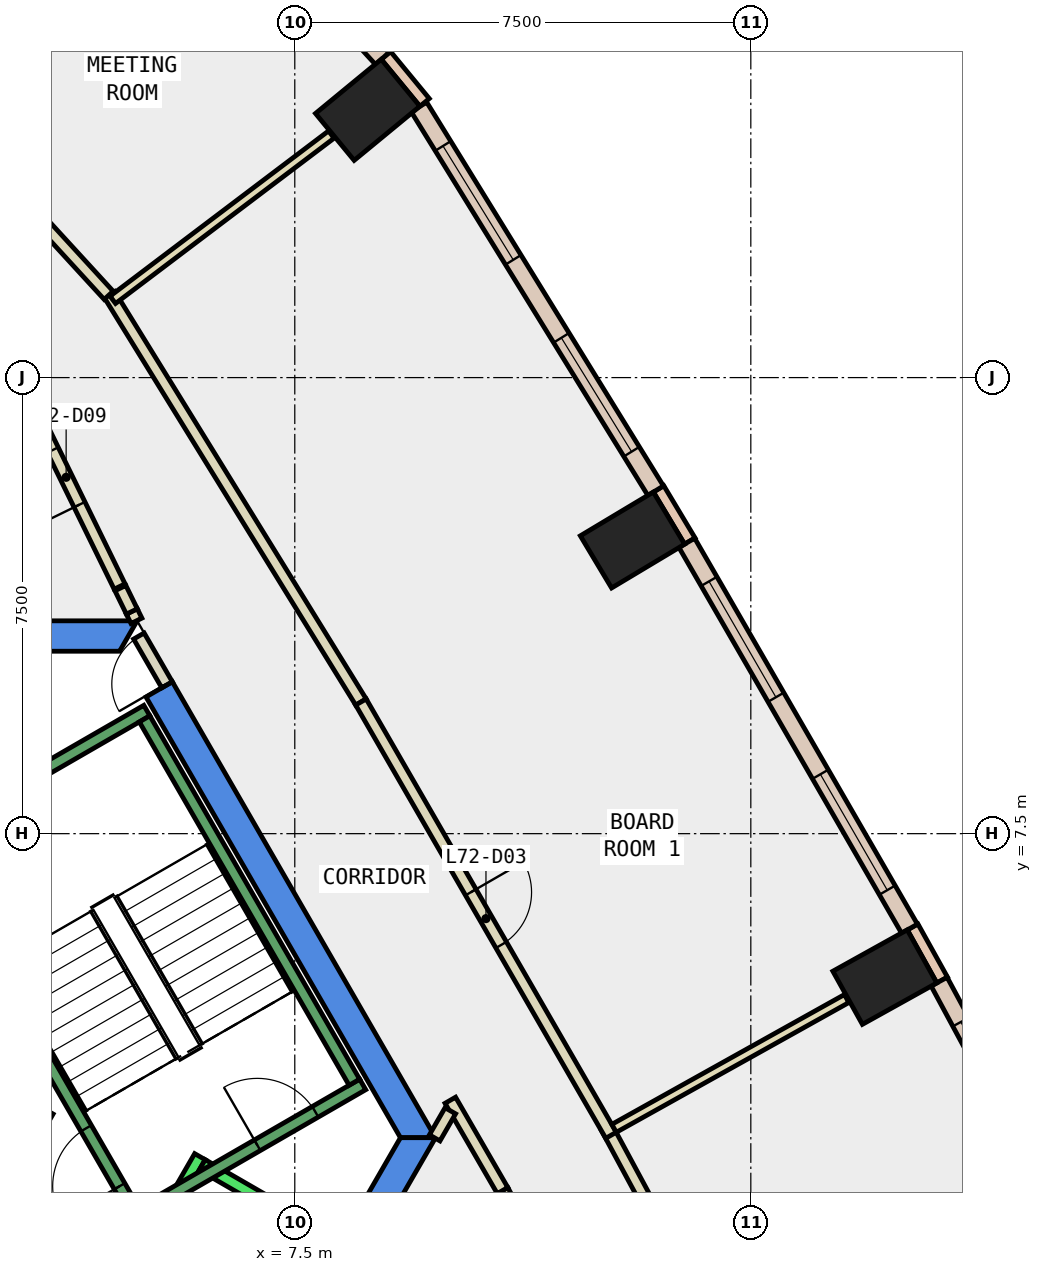
"""IFC4 building model, lengths in metres.
Left out: names, types, materials, properties, quantities, classifications, styles, units other than length and angle.
Written with IfcOpenShell. Run it as: python <this file> out.ifc"""

import sys

from ifc_helpers import new_model, si_unit, direction, frame, frame_2d, origin, origin_2d, place, context, subcontext, project, spatial, polyline, rectangle, outline, extrude, element, fill, save


model = new_model("IFC4")
c1 = context("Model", 3, precision=1e-05, world=origin(), true_north=direction((0.0, 1.0)))
c2 = subcontext(c1, "Body", "Model", "MODEL_VIEW")
j1 = project(units=[si_unit("LENGTHUNIT", "METRE"), si_unit("PLANEANGLEUNIT", "RADIAN")], contexts=[c1])
p1 = place(None, origin())
s1 = spatial("IfcSite", under=j1, at=p1, CompositionType="ELEMENT")
p2 = place(p1, origin())
s2 = spatial("IfcBuilding", under=s1, at=p2, CompositionType="ELEMENT")
p3 = place(p2, frame((0.0, 0.0, 308.0)))
s3 = spatial("IfcBuildingStorey", under=s2, at=p3, CompositionType="ELEMENT", Elevation=308.0)
for number, where, z_axis, x_axis in (
    (1, (17.204, 5.141, -0.34), (0.0, 0.0, 1.0), (-0.486, 0.874, 0.0)),
    (2, (13.054, 12.329, -0.34), (0.0, 0.0, 1.0), (-0.514, 0.858, 0.0)),
    (3, (8.699, 19.403, -0.34), (0.0, 0.0, 1.0), (-0.636, 0.772, 0.0)),
):
    element("IfcColumn", number, at=place(p3, frame(where, z_axis=z_axis, x_axis=x_axis)), inside=s3, PredefinedType="COLUMN", context=c2, shape_type="SweptSolid", body=[
        extrude(rectangle(XDim=1.0, YDim=1.4, at=origin_2d()), origin(), (0.0, 0.0, 1.0), 3.6),
    ])
p4 = place(p3, frame((0.0, 0.0, -0.34)))
e4 = element("IfcWall", 4, at=p4, inside=s3, PredefinedType="SHEAR", context=c2, shape_type="SweptSolid", body=[
    extrude(outline(polyline([(5.486, 9.998), (5.053, 9.748), (9.238, 2.5), (9.815, 2.5), (5.486, 9.998)])), origin(), (0.0, 0.0, 1.0), 3.6),
])
p5 = place(p3, frame((0.0, 0.0, -0.34)))
e5 = element("IfcWall", 5, at=p5, inside=s3, PredefinedType="SHEAR", context=c2, shape_type="SweptSolid", body=[
    extrude(outline(polyline([(4.907, 11.0), (-4.907, 11.0), (-4.619, 10.5), (4.619, 10.5), (4.907, 11.0)])), origin(), (0.0, 0.0, 1.0), 3.6),
])
p6 = place(p3, frame((0.0, 0.0, -0.34)))
e6 = element("IfcWall", 6, at=p6, inside=s3, PredefinedType="SHEAR", context=c2, shape_type="SweptSolid", body=[
    extrude(outline(polyline([(4.907, -6.0), (9.815, 2.5), (9.238, 2.5), (4.619, -5.5), (4.907, -6.0)])), origin(), (0.0, 0.0, 1.0), 3.6),
])
p7 = place(p3, frame((18.147, 5.092, 0.0), z_axis=(0.0, 0.0, 1.0), x_axis=(-0.486036693078, 0.873938403425, 0.0)))
e7 = element("IfcWall", 7, at=p7, inside=s3, PredefinedType="STANDARD", context=c2, shape_type="SweptSolid", body=[
    extrude(rectangle(XDim=1.0, YDim=0.2, at=frame_2d((0.5, 0.0))), origin(), (0.0, 0.0, 1.0), 3.26),
])
p8 = place(p3, frame((13.997, 12.312, 0.0), z_axis=(0.0, 0.0, 1.0), x_axis=(-0.514064933905, 0.857751271482, 0.0)))
e8 = element("IfcWall", 8, at=p8, inside=s3, PredefinedType="STANDARD", context=c2, shape_type="SweptSolid", body=[
    extrude(rectangle(XDim=1.0, YDim=0.2, at=frame_2d((0.5, 0.0))), origin(), (0.0, 0.0, 1.0), 3.26),
])
p9 = place(p3, frame((9.635, 19.525, 0.0), z_axis=(0.0, 0.0, 1.0), x_axis=(-0.6357329148, 0.77190910154, 0.0)))
e9 = element("IfcWall", 9, at=p9, inside=s3, PredefinedType="STANDARD", context=c2, shape_type="SweptSolid", body=[
    extrude(rectangle(XDim=1.0, YDim=0.2, at=frame_2d((0.5, 0.0))), origin(), (0.0, 0.0, 1.0), 3.26),
])
p10 = place(p3, frame((21.615, -1.462, 0.0), z_axis=(0.0, 0.0, 1.0), x_axis=(-0.474421773145, 0.880297666228, 0.0)))
e10 = element("IfcWall", 10, at=p10, inside=s3, PredefinedType="STANDARD", context=c2, shape_type="SweptSolid", body=[
    extrude(rectangle(XDim=7.416, YDim=0.3, at=frame_2d((3.708, 0.0))), origin(), (0.0, 0.0, 1.0), 3.26),
])
p11 = place(p10, frame((0.754, 0.0, 0.9)))
e11 = element("IfcOpeningElement", 11, at=p11, cuts=e10, PredefinedType="OPENING", context=c2, shape_type="SweptSolid", body=[
    extrude(rectangle(XDim=2.2, YDim=2.0, at=frame_2d((1.1, 1.0))), frame((0.0, 0.16, 0.0), z_axis=(0.0, -1.0, 0.0), x_axis=(1.0, 0.0, 0.0)), (0.0, 0.0, 1.0), 0.32),
])
p12 = place(p10, frame((4.462, 0.0, 0.9)))
e12 = element("IfcOpeningElement", 12, at=p12, cuts=e10, PredefinedType="OPENING", context=c2, shape_type="SweptSolid", body=[
    extrude(rectangle(XDim=2.2, YDim=2.0, at=frame_2d((1.1, 1.0))), frame((0.0, 0.16, 0.0), z_axis=(0.0, -1.0, 0.0), x_axis=(1.0, 0.0, 0.0)), (0.0, 0.0, 1.0), 0.32),
])
p13 = place(p3, frame((17.61, 5.937, 0.0), z_axis=(0.0, 0.0, 1.0), x_axis=(-0.499923391538, 0.866069629183, 0.0)))
e13 = element("IfcWall", 13, at=p13, inside=s3, PredefinedType="STANDARD", context=c2, shape_type="SweptSolid", body=[
    extrude(rectangle(XDim=7.327, YDim=0.3, at=frame_2d((3.664, 0.0))), origin(), (0.0, 0.0, 1.0), 3.26),
])
p14 = place(p13, frame((0.732, 0.0, 0.9)))
e14 = element("IfcOpeningElement", 14, at=p14, cuts=e13, PredefinedType="OPENING", context=c2, shape_type="SweptSolid", body=[
    extrude(rectangle(XDim=2.2, YDim=2.0, at=frame_2d((1.1, 1.0))), frame((0.0, 0.16, 0.0), z_axis=(0.0, -1.0, 0.0), x_axis=(1.0, 0.0, 0.0)), (0.0, 0.0, 1.0), 0.32),
])
p15 = place(p13, frame((4.395, 0.0, 0.9)))
e15 = element("IfcOpeningElement", 15, at=p15, cuts=e13, PredefinedType="OPENING", context=c2, shape_type="SweptSolid", body=[
    extrude(rectangle(XDim=2.2, YDim=2.0, at=frame_2d((1.1, 1.0))), frame((0.0, 0.16, 0.0), z_axis=(0.0, -1.0, 0.0), x_axis=(1.0, 0.0, 0.0)), (0.0, 0.0, 1.0), 0.32),
])
p16 = place(p3, frame((13.435, 13.14, 0.0), z_axis=(0.0, 0.0, 1.0), x_axis=(-0.525070792614, 0.851058554239, 0.0)))
e16 = element("IfcWall", 16, at=p16, inside=s3, PredefinedType="STANDARD", context=c2, shape_type="SweptSolid", body=[
    extrude(rectangle(XDim=7.414, YDim=0.3, at=frame_2d((3.707, 0.0))), origin(), (0.0, 0.0, 1.0), 3.26),
])
p17 = place(p16, frame((0.754, 0.0, 0.9)))
e17 = element("IfcOpeningElement", 17, at=p17, cuts=e16, PredefinedType="OPENING", context=c2, shape_type="SweptSolid", body=[
    extrude(rectangle(XDim=2.2, YDim=2.0, at=frame_2d((1.1, 1.0))), frame((0.0, 0.16, 0.0), z_axis=(0.0, -1.0, 0.0), x_axis=(1.0, 0.0, 0.0)), (0.0, 0.0, 1.0), 0.32),
])
p18 = place(p16, frame((4.461, 0.0, 0.9)))
e18 = element("IfcOpeningElement", 18, at=p18, cuts=e16, PredefinedType="OPENING", context=c2, shape_type="SweptSolid", body=[
    extrude(rectangle(XDim=2.2, YDim=2.0, at=frame_2d((1.1, 1.0))), frame((0.0, 0.16, 0.0), z_axis=(0.0, -1.0, 0.0), x_axis=(1.0, 0.0, 0.0)), (0.0, 0.0, 1.0), 0.32),
])
p19 = place(p3, frame((8.94, 20.248, 0.0), z_axis=(0.0, 0.0, 1.0), x_axis=(-0.675798306171, 0.737086595575, 0.0)))
e19 = element("IfcWall", 19, at=p19, inside=s3, PredefinedType="STANDARD", context=c2, shape_type="SweptSolid", body=[
    extrude(rectangle(XDim=4.501, YDim=0.3, at=frame_2d((2.25, 0.0))), origin(), (0.0, 0.0, 1.0), 3.26),
])
p20 = place(p19, frame((1.551, 0.0, 0.9)))
e20 = element("IfcOpeningElement", 20, at=p20, cuts=e19, PredefinedType="OPENING", context=c2, shape_type="SweptSolid", body=[
    extrude(rectangle(XDim=1.4, YDim=2.0, at=frame_2d((0.7, 1.0))), frame((0.0, 0.16, 0.0), z_axis=(0.0, -1.0, 0.0), x_axis=(1.0, 0.0, 0.0)), (0.0, 0.0, 1.0), 0.32),
])
p21 = place(p3, frame((4.896, 11.0, 0.0), z_axis=(0.0, 0.0, 1.0), x_axis=(-0.44208884847, 0.896971264901, 0.0)))
e21 = element("IfcWall", 21, at=p21, inside=s3, PredefinedType="PARTITIONING", context=c2, shape_type="SweptSolid", body=[
    extrude(rectangle(XDim=0.172, YDim=0.2, at=frame_2d((0.086, 0.0))), origin(), (0.0, 0.0, 1.0), 2.4),
])
p22 = place(p3, frame((4.619, 11.564, 0.0), z_axis=(0.0, 0.0, 1.0), x_axis=(-0.439654479941, 0.898166987964, 0.0)))
e22 = element("IfcWall", 22, at=p22, inside=s3, PredefinedType="PARTITIONING", context=c2, shape_type="SweptSolid", body=[
    extrude(rectangle(XDim=4.0, YDim=0.2, at=frame_2d((2.0, 0.0))), origin(), (0.0, 0.0, 1.0), 3.26),
])
p23 = place(p22, frame((1.5, 0.0, 0.0)))
e23 = element("IfcOpeningElement", 23, at=p23, cuts=e22, PredefinedType="OPENING", context=c2, shape_type="SweptSolid", body=[
    extrude(rectangle(XDim=1.0, YDim=2.1, at=frame_2d((0.5, 1.05))), frame((0.0, 0.11, 0.0), z_axis=(0.0, -1.0, 0.0), x_axis=(1.0, 0.0, 0.0)), (0.0, 0.0, 1.0), 0.22),
])
p24 = place(p3, frame((14.549, -5.107, 0.0), z_axis=(0.0, 0.0, 1.0), x_axis=(-0.47449538478, 0.880257990491, 0.0)))
e24 = element("IfcWall", 24, at=p24, inside=s3, PredefinedType="PARTITIONING", context=c2, shape_type="SweptSolid", body=[
    extrude(rectangle(XDim=7.655, YDim=0.2, at=frame_2d((3.827, 0.0))), origin(), (0.0, 0.0, 1.0), 3.26),
])
p25 = place(p24, frame((2.927, 0.0, 0.0)))
e25 = element("IfcOpeningElement", 25, at=p25, cuts=e24, PredefinedType="OPENING", context=c2, shape_type="SweptSolid", body=[
    extrude(rectangle(XDim=1.8, YDim=2.1, at=frame_2d((0.9, 1.05))), frame((0.0, 0.11, 0.0), z_axis=(0.0, -1.0, 0.0), x_axis=(1.0, 0.0, 0.0)), (0.0, 0.0, 1.0), 0.22),
])
p26 = place(p3, frame((10.917, 1.631, 0.0), z_axis=(0.0, 0.0, 1.0), x_axis=(-0.500699613169, 0.865621104972, 0.0)))
e26 = element("IfcWall", 26, at=p26, inside=s3, PredefinedType="PARTITIONING", context=c2, shape_type="SweptSolid", body=[
    extrude(rectangle(XDim=1.715, YDim=0.2, at=frame_2d((0.858, 0.0))), origin(), (0.0, 0.0, 1.0), 3.26),
])
p27 = place(p3, frame((10.058, 2.943, 0.0), z_axis=(0.0, 0.0, 1.0), x_axis=(-0.499352927503, -0.866398669086, 0.0)))
e27 = element("IfcWall", 27, at=p27, inside=s3, PredefinedType="PARTITIONING", context=c2, shape_type="SweptSolid", body=[
    extrude(rectangle(XDim=0.515, YDim=0.2, at=frame_2d((0.257, 0.0))), origin(), (0.0, 0.0, 1.0), 3.26),
])
p28 = place(p3, frame((12.628, 2.671, 0.0), z_axis=(0.0, 0.0, 1.0), x_axis=(0.474489967676, -0.880260910512, 0.0)))
e28 = element("IfcWall", 28, at=p28, inside=s3, PredefinedType="PARTITIONING", context=c2, shape_type="SweptSolid", body=[
    extrude(rectangle(XDim=7.948, YDim=0.2, at=frame_2d((3.974, 0.0))), origin(), (0.0, 0.0, 1.0), 3.26),
])
p29 = place(p28, frame((3.474, 0.0, 0.0)))
e29 = element("IfcOpeningElement", 29, at=p29, cuts=e28, PredefinedType="OPENING", context=c2, shape_type="SweptSolid", body=[
    extrude(rectangle(XDim=1.0, YDim=2.1, at=frame_2d((0.5, 1.05))), frame((0.0, 0.11, 0.0), z_axis=(0.0, -1.0, 0.0), x_axis=(1.0, 0.0, 0.0)), (0.0, 0.0, 1.0), 0.22),
])
p30 = place(p3, frame((4.454, 16.364, 0.0), z_axis=(0.0, 0.0, 1.0), x_axis=(0.525142215688, -0.851014484778, 0.0)))
e30 = element("IfcWall", 30, at=p30, inside=s3, PredefinedType="PARTITIONING", context=c2, shape_type="SweptSolid", body=[
    extrude(rectangle(XDim=7.872, YDim=0.2, at=frame_2d((3.936, 0.0))), origin(), (0.0, 0.0, 1.0), 3.26),
])
p31 = place(p3, frame((8.588, 9.665, 0.0), z_axis=(0.0, 0.0, 1.0), x_axis=(0.499946799636, -0.86605611685, 0.0)))
e31 = element("IfcWall", 31, at=p31, inside=s3, PredefinedType="PARTITIONING", context=c2, shape_type="SweptSolid", body=[
    extrude(rectangle(XDim=8.227, YDim=0.2, at=frame_2d((4.114, 0.0))), origin(), (0.0, 0.0, 1.0), 3.26),
])
p32 = place(p31, frame((3.613, 0.0, 0.0)))
e32 = element("IfcOpeningElement", 32, at=p32, cuts=e31, PredefinedType="OPENING", context=c2, shape_type="SweptSolid", body=[
    extrude(rectangle(XDim=1.0, YDim=2.1, at=frame_2d((0.5, 1.05))), frame((0.0, 0.11, 0.0), z_axis=(0.0, -1.0, 0.0), x_axis=(1.0, 0.0, 0.0)), (0.0, 0.0, 1.0), 0.22),
])
p33 = place(p3, frame((2.204, 18.791, 0.0), z_axis=(0.0, 0.0, 1.0), x_axis=(0.675731313907, -0.737148011871, 0.0)))
e33 = element("IfcWall", 33, at=p33, inside=s3, PredefinedType="PARTITIONING", context=c2, shape_type="SweptSolid", body=[
    extrude(rectangle(XDim=3.307, YDim=0.2, at=frame_2d((1.654, 0.0))), origin(), (0.0, 0.0, 1.0), 3.26),
])
p34 = place(p3, frame((1.866, 3.732, 0.0), z_axis=(0.0, 0.0, 1.0), x_axis=(0.866043361281, -0.499968895414, 0.0)))
e34 = element("IfcWall", 34, at=p34, inside=s3, PredefinedType="PARTITIONING", context=c2, shape_type="SweptSolid", body=[
    extrude(rectangle(XDim=1.858, YDim=0.2, at=frame_2d((0.929, 0.0))), origin(), (0.0, 0.0, 1.0), 3.26),
])
p35 = place(p34, frame((0.379, 0.0, 0.0)))
e35 = element("IfcOpeningElement", 35, at=p35, cuts=e34, PredefinedType="OPENING", context=c2, shape_type="SweptSolid", body=[
    extrude(rectangle(XDim=1.0, YDim=2.1, at=frame_2d((0.5, 1.05))), frame((0.0, 0.11, 0.0), z_axis=(0.0, -1.0, 0.0), x_axis=(1.0, 0.0, 0.0)), (0.0, 0.0, 1.0), 0.22),
])
p36 = place(p3, frame((12.751, 2.654, 0.0), z_axis=(0.0, 0.0, 1.0), x_axis=(0.873277679945, 0.487222837837, 0.0)))
e36 = element("IfcWall", 36, at=p36, inside=s3, PredefinedType="PARTITIONING", context=c2, shape_type="SweptSolid", body=[
    extrude(rectangle(XDim=4.38, YDim=0.15, at=frame_2d((2.19, 0.0))), origin(), (0.0, 0.0, 1.0), 3.26),
])
p37 = place(p3, frame((4.507, 16.279, 0.0), z_axis=(0.0, 0.0, 1.0), x_axis=(0.797594482062, 0.603194033611, 0.0)))
e37 = element("IfcWall", 37, at=p37, inside=s3, PredefinedType="PARTITIONING", context=c2, shape_type="SweptSolid", body=[
    extrude(rectangle(XDim=4.506, YDim=0.15, at=frame_2d((2.253, 0.0))), origin(), (0.0, 0.0, 1.0), 3.26),
])
p38 = place(p3, frame((5.399, 9.948, 0.0), z_axis=(0.0, 0.0, 1.0), x_axis=(-0.499882215713, 0.866093395895, 0.0)))
e38 = element("IfcWall", 38, at=p38, inside=s3, PredefinedType="PARTITIONING", context=c2, shape_type="SweptSolid", body=[
    extrude(rectangle(XDim=0.926, YDim=0.2, at=frame_2d((0.463, 0.0))), origin(), (0.0, 0.0, 1.0), 2.4),
])
p39 = place(p38, frame((0.017, 0.0, 0.0)))
e39 = element("IfcOpeningElement", 39, at=p39, cuts=e38, PredefinedType="OPENING", context=c2, shape_type="SweptSolid", body=[
    extrude(rectangle(XDim=0.9, YDim=2.1, at=frame_2d((0.45, 1.05))), frame((0.0, 0.11, 0.0), z_axis=(0.0, -1.0, 0.0), x_axis=(1.0, 0.0, 0.0)), (0.0, 0.0, 1.0), 0.22),
])
p40 = place(p3, frame((4.82, 11.154, 0.0), z_axis=(0.0, 0.0, 1.0), x_axis=(-0.439660677009, 0.898163954461, 0.0)))
e40 = element("IfcWall", 40, at=p40, inside=s3, PredefinedType="PARTITIONING", context=c2, shape_type="SweptSolid", body=[
    extrude(rectangle(XDim=0.427, YDim=0.2, at=frame_2d((0.214, 0.0))), origin(), (0.0, 0.0, 1.0), 3.26),
])
p41 = place(p3, frame((3.24, -2.488, 0.0), z_axis=(0.0, 0.0, 1.0), x_axis=(0.500034260056, 0.866005622828, 0.0)))
e41 = element("IfcWall", 41, at=p41, inside=s3, PredefinedType="STANDARD", context=c2, shape_type="SweptSolid", body=[
    extrude(rectangle(XDim=5.399, YDim=0.2, at=frame_2d((2.7, 0.0))), origin(), (0.0, 0.0, 1.0), 3.26),
])
p42 = place(p41, frame((3.225, 0.0, 0.0)))
e42 = element("IfcOpeningElement", 42, at=p42, cuts=e41, PredefinedType="OPENING", context=c2, shape_type="SweptSolid", body=[
    extrude(rectangle(XDim=1.1, YDim=2.1, at=frame_2d((0.55, 1.05))), frame((0.0, 0.11, 0.0), z_axis=(0.0, -1.0, 0.0), x_axis=(1.0, 0.0, 0.0)), (0.0, 0.0, 1.0), 0.22),
])
p43 = place(p41, frame((1.225, 0.0, 0.0)))
e43 = element("IfcOpeningElement", 43, at=p43, cuts=e41, PredefinedType="OPENING", context=c2, shape_type="SweptSolid", body=[
    extrude(rectangle(XDim=1.1, YDim=2.1, at=frame_2d((0.55, 1.05))), frame((0.0, 0.11, 0.0), z_axis=(0.0, -1.0, 0.0), x_axis=(1.0, 0.0, 0.0)), (0.0, 0.0, 1.0), 0.22),
])
p44 = place(p3, frame((5.977, 2.052, 0.0), z_axis=(0.0, 0.0, 1.0), x_axis=(0.865973769406, -0.500089422704, 0.0)))
e44 = element("IfcWall", 44, at=p44, inside=s3, PredefinedType="STANDARD", context=c2, shape_type="SweptSolid", body=[
    extrude(rectangle(XDim=2.399, YDim=0.2, at=frame_2d((1.2, 0.0))), origin(), (0.0, 0.0, 1.0), 3.26),
])
p45 = place(p3, frame((4.806, 1.176, 0.0), z_axis=(0.0, 0.0, 1.0), x_axis=(0.866059941101, 0.499940174841, 0.0)))
e45 = element("IfcWall", 45, at=p45, inside=s3, PredefinedType="STANDARD", context=c2, shape_type="SweptSolid", body=[
    extrude(rectangle(XDim=4.4, YDim=0.2, at=frame_2d((2.2, 0.0))), origin(), (0.0, 0.0, 1.0), 3.26),
])
p46 = place(p45, frame((2.4, 0.0, 0.0)))
e46 = element("IfcOpeningElement", 46, at=p46, cuts=e45, PredefinedType="OPENING", context=c2, shape_type="SweptSolid", body=[
    extrude(rectangle(XDim=1.1, YDim=2.2, at=frame_2d((0.55, 1.1))), frame((0.0, 0.11, 0.0), z_axis=(0.0, -1.0, 0.0), x_axis=(1.0, 0.0, 0.0)), (0.0, 0.0, 1.0), 0.22),
])
p47 = place(p3, frame((2.7, 8.158, 0.0), z_axis=(0.0, 0.0, 1.0), x_axis=(0.86611865017, 0.499838457731, 0.0)))
e47 = element("IfcWall", 47, at=p47, inside=s3, PredefinedType="STANDARD", context=c2, shape_type="SweptSolid", body=[
    extrude(rectangle(XDim=2.733, YDim=0.2, at=frame_2d((1.366, 0.0))), origin(), (0.0, 0.0, 1.0), 3.26),
])
p48 = place(p3, frame((4.843, 1.312, 0.0), z_axis=(0.0, 0.0, 1.0), x_axis=(-0.499963383562, 0.866046543262, 0.0)))
e48 = element("IfcWall", 48, at=p48, inside=s3, PredefinedType="STANDARD", context=c2, shape_type="SweptSolid", body=[
    extrude(rectangle(XDim=6.9, YDim=0.2, at=frame_2d((3.45, 0.0))), origin(), (0.0, 0.0, 1.0), 3.26),
])
p49 = place(p48, frame((0.45, 0.0, 0.0)))
e49 = element("IfcOpeningElement", 49, at=p49, cuts=e48, PredefinedType="OPENING", context=c2, shape_type="SweptSolid", body=[
    extrude(rectangle(XDim=1.1, YDim=2.2, at=frame_2d((0.55, 1.1))), frame((0.0, 0.11, 0.0), z_axis=(0.0, -1.0, 0.0), x_axis=(1.0, 0.0, 0.0)), (0.0, 0.0, 1.0), 0.22),
])
p50 = place(p3, frame((8.48, 3.412, 0.0), z_axis=(0.0, 0.0, 1.0), x_axis=(-0.499978703459, 0.866037698999, 0.0)))
e50 = element("IfcWall", 50, at=p50, inside=s3, PredefinedType="STANDARD", context=c2, shape_type="SweptSolid", body=[
    extrude(rectangle(XDim=6.9, YDim=0.2, at=frame_2d((3.45, 0.0))), origin(), (0.0, 0.0, 1.0), 3.26),
])
p51 = place(p12, origin())
e51 = element("IfcWindow", 51, at=p51, inside=s3, PartitioningType="SINGLE_PANEL", PredefinedType="WINDOW", context=c2, shape_type="SweptSolid", body=[
    extrude(rectangle(XDim=2.2, YDim=2.0, at=frame_2d((1.1, 1.0))), frame((0.0, 0.03, 0.0), z_axis=(0.0, -1.0, 0.0), x_axis=(1.0, 0.0, 0.0)), (0.0, 0.0, 1.0), 0.06),
])
fill(e12, e51)
p52 = place(p14, origin())
e52 = element("IfcWindow", 52, at=p52, inside=s3, PartitioningType="SINGLE_PANEL", PredefinedType="WINDOW", context=c2, shape_type="SweptSolid", body=[
    extrude(rectangle(XDim=2.2, YDim=2.0, at=frame_2d((1.1, 1.0))), frame((0.0, 0.03, 0.0), z_axis=(0.0, -1.0, 0.0), x_axis=(1.0, 0.0, 0.0)), (0.0, 0.0, 1.0), 0.06),
])
fill(e14, e52)
p53 = place(p15, origin())
e53 = element("IfcWindow", 53, at=p53, inside=s3, PartitioningType="SINGLE_PANEL", PredefinedType="WINDOW", context=c2, shape_type="SweptSolid", body=[
    extrude(rectangle(XDim=2.2, YDim=2.0, at=frame_2d((1.1, 1.0))), frame((0.0, 0.03, 0.0), z_axis=(0.0, -1.0, 0.0), x_axis=(1.0, 0.0, 0.0)), (0.0, 0.0, 1.0), 0.06),
])
fill(e15, e53)
p54 = place(p17, origin())
e54 = element("IfcWindow", 54, at=p54, inside=s3, PartitioningType="SINGLE_PANEL", PredefinedType="WINDOW", context=c2, shape_type="SweptSolid", body=[
    extrude(rectangle(XDim=2.2, YDim=2.0, at=frame_2d((1.1, 1.0))), frame((0.0, 0.03, 0.0), z_axis=(0.0, -1.0, 0.0), x_axis=(1.0, 0.0, 0.0)), (0.0, 0.0, 1.0), 0.06),
])
fill(e17, e54)
p55 = place(p18, origin())
e55 = element("IfcWindow", 55, at=p55, inside=s3, PartitioningType="SINGLE_PANEL", PredefinedType="WINDOW", context=c2, shape_type="SweptSolid", body=[
    extrude(rectangle(XDim=2.2, YDim=2.0, at=frame_2d((1.1, 1.0))), frame((0.0, 0.03, 0.0), z_axis=(0.0, -1.0, 0.0), x_axis=(1.0, 0.0, 0.0)), (0.0, 0.0, 1.0), 0.06),
])
fill(e18, e55)
p56 = place(p32, origin())
e56 = element("IfcDoor", 56, at=p56, inside=s3, OperationType="SINGLE_SWING_RIGHT", PredefinedType="DOOR", context=c2, shape_type="SweptSolid", body=[
    extrude(rectangle(XDim=1.0, YDim=2.1, at=frame_2d((0.5, 1.05))), frame((0.0, 0.025, 0.0), z_axis=(0.0, -1.0, 0.0), x_axis=(1.0, 0.0, 0.0)), (0.0, 0.0, 1.0), 0.05),
])
fill(e32, e56)
p57 = place(p23, origin())
e57 = element("IfcDoor", 57, at=p57, inside=s3, OperationType="SINGLE_SWING_LEFT", PredefinedType="DOOR", context=c2, shape_type="SweptSolid", body=[
    extrude(rectangle(XDim=1.0, YDim=2.1, at=frame_2d((0.5, 1.05))), frame((0.0, 0.025, 0.0), z_axis=(0.0, -1.0, 0.0), x_axis=(1.0, 0.0, 0.0)), (0.0, 0.0, 1.0), 0.05),
])
fill(e23, e57)
p58 = place(p39, origin())
e58 = element("IfcDoor", 58, at=p58, inside=s3, OperationType="SINGLE_SWING_LEFT", PredefinedType="DOOR", context=c2, shape_type="SweptSolid", body=[
    extrude(rectangle(XDim=0.9, YDim=2.1, at=frame_2d((0.45, 1.05))), frame((0.0, 0.025, 0.0), z_axis=(0.0, -1.0, 0.0), x_axis=(1.0, 0.0, 0.0)), (0.0, 0.0, 1.0), 0.05),
])
fill(e39, e58)
p59 = place(p49, origin())
e59 = element("IfcDoor", 59, at=p59, inside=s3, OperationType="SINGLE_SWING_LEFT", PredefinedType="DOOR", context=c2, shape_type="SweptSolid", body=[
    extrude(rectangle(XDim=1.1, YDim=2.2, at=frame_2d((0.55, 1.1))), frame((0.0, 0.025, 0.0), z_axis=(0.0, -1.0, 0.0), x_axis=(1.0, 0.0, 0.0)), (0.0, 0.0, 1.0), 0.05),
])
fill(e49, e59)
p60 = place(p46, origin())
e60 = element("IfcDoor", 60, at=p60, inside=s3, OperationType="SINGLE_SWING_LEFT", PredefinedType="DOOR", context=c2, shape_type="SweptSolid", body=[
    extrude(rectangle(XDim=1.1, YDim=2.2, at=frame_2d((0.55, 1.1))), frame((0.0, 0.025, 0.0), z_axis=(0.0, -1.0, 0.0), x_axis=(1.0, 0.0, 0.0)), (0.0, 0.0, 1.0), 0.05),
])
fill(e46, e60)
save(model, sys.argv[1])
